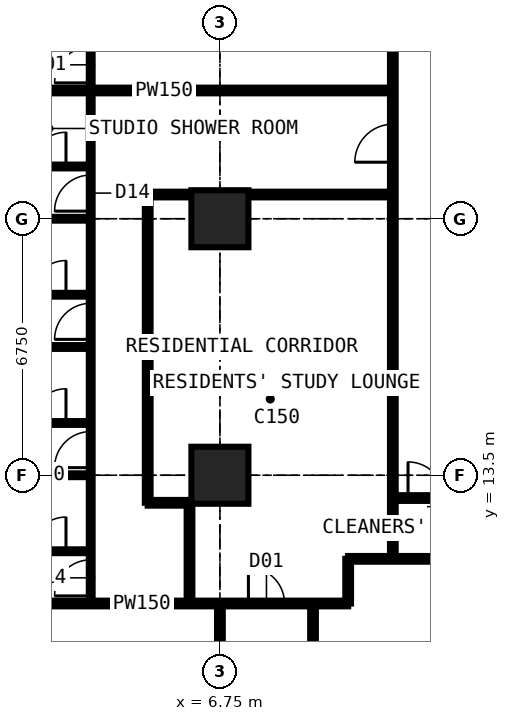
"""IFC4 building model, lengths in metres.
Left out: names, types, materials, properties, quantities, classifications, styles, units other than length and angle.
Written with IfcOpenShell. Run it as: python <this file> out.ifc"""

import sys

from ifc_helpers import new_model, si_unit, direction, frame, frame_2d, origin, origin_2d, place, context, subcontext, project, spatial, rectangle, extrude, element, fill, save


model = new_model("IFC4")
c1 = context("Model", 3, precision=1e-05, world=origin(), true_north=direction((0.0, 1.0)))
c2 = subcontext(c1, "Body", "Model", "MODEL_VIEW")
j1 = project(units=[si_unit("LENGTHUNIT", "METRE"), si_unit("PLANEANGLEUNIT", "RADIAN")], contexts=[c1])
p1 = place(None, origin())
s1 = spatial("IfcSite", under=j1, at=p1, CompositionType="ELEMENT")
p2 = place(p1, origin())
s2 = spatial("IfcBuilding", under=s1, at=p2, CompositionType="ELEMENT")
p3 = place(p2, frame((0.0, 0.0, 156.6)))
s3 = spatial("IfcBuildingStorey", under=s2, at=p3, CompositionType="ELEMENT", Elevation=156.6)
for number, where, z_axis, x_axis in (
    (1, (6.75, 13.5, 0.0), (0.0, 0.0, 1.0), (1.0, 0.0, 0.0)),
    (2, (6.75, 20.25, 0.0), (0.0, 0.0, 1.0), (1.0, 0.0, 0.0)),
):
    element("IfcColumn", number, at=place(p3, frame(where, z_axis=z_axis, x_axis=x_axis)), inside=s3, PredefinedType="COLUMN", context=c2, shape_type="SweptSolid", body=[
        extrude(rectangle(XDim=1.5, YDim=1.5, at=origin_2d()), origin(), (0.0, 0.0, 1.0), 3.6),
    ])
p4 = place(p3, frame((-0.734, 10.125, 0.0), z_axis=(0.0, 0.0, 1.0), x_axis=(1.0, 0.0, 0.0)))
e3 = element("IfcWall", 3, at=p4, inside=s3, PredefinedType="PARTITIONING", context=c2, shape_type="SweptSolid", body=[
    extrude(rectangle(XDim=10.859, YDim=0.15, at=frame_2d((5.429, 0.0))), origin(), (0.0, 0.0, 1.0), 3.375),
])
p5 = place(p4, frame((8.234, 0.0, 0.0)))
e4 = element("IfcOpeningElement", 4, at=p5, cuts=e3, PredefinedType="OPENING", context=c2, shape_type="SweptSolid", body=[
    extrude(rectangle(XDim=0.95, YDim=2.2, at=frame_2d((0.475, 1.1))), frame((0.0, 0.085, 0.0), z_axis=(0.0, -1.0, 0.0), x_axis=(1.0, 0.0, 0.0)), (0.0, 0.0, 1.0), 0.17),
])
p6 = place(p3, frame((-0.734, 13.5, 0.0), z_axis=(0.0, 0.0, 1.0), x_axis=(1.0, 0.0, 0.0)))
e5 = element("IfcWall", 5, at=p6, inside=s3, PredefinedType="PARTITIONING", context=c2, shape_type="SweptSolid", body=[
    extrude(rectangle(XDim=4.084, YDim=0.1, at=frame_2d((2.042, 0.0))), origin(), (0.0, 0.0, 1.0), 2.877),
])
p7 = place(p3, frame((-0.734, 16.875, 0.0), z_axis=(0.0, 0.0, 1.0), x_axis=(1.0, 0.0, 0.0)))
e6 = element("IfcWall", 6, at=p7, inside=s3, PredefinedType="PARTITIONING", context=c2, shape_type="SweptSolid", body=[
    extrude(rectangle(XDim=4.084, YDim=0.1, at=frame_2d((2.042, 0.0))), origin(), (0.0, 0.0, 1.0), 3.375),
])
p8 = place(p3, frame((-0.734, 20.25, 0.0), z_axis=(0.0, 0.0, 1.0), x_axis=(1.0, 0.0, 0.0)))
e7 = element("IfcWall", 7, at=p8, inside=s3, PredefinedType="PARTITIONING", context=c2, shape_type="SweptSolid", body=[
    extrude(rectangle(XDim=4.084, YDim=0.1, at=frame_2d((2.042, 0.0))), origin(), (0.0, 0.0, 1.0), 2.877),
])
p9 = place(p3, frame((-0.734, 23.625, 0.0), z_axis=(0.0, 0.0, 1.0), x_axis=(1.0, 0.0, 0.0)))
e8 = element("IfcWall", 8, at=p9, inside=s3, PredefinedType="PARTITIONING", context=c2, shape_type="SweptSolid", body=[
    extrude(rectangle(XDim=12.034, YDim=0.15, at=frame_2d((6.017, 0.0))), origin(), (0.0, 0.0, 1.0), 3.375),
])
p10 = place(p3, frame((1.15, 11.5, 0.0), z_axis=(0.0, 0.0, 1.0), x_axis=(1.0, 0.0, 0.0)))
e9 = element("IfcWall", 9, at=p10, inside=s3, PredefinedType="PARTITIONING", context=c2, shape_type="SweptSolid", body=[
    extrude(rectangle(XDim=2.2, YDim=0.1, at=frame_2d((1.1, 0.0))), origin(), (0.0, 0.0, 1.0), 3.375),
])
p11 = place(p10, frame((0.65, 0.0, 0.0)))
e10 = element("IfcOpeningElement", 10, at=p11, cuts=e9, PredefinedType="OPENING", context=c2, shape_type="SweptSolid", body=[
    extrude(rectangle(XDim=0.9, YDim=2.2, at=frame_2d((0.45, 1.1))), frame((0.0, 0.06, 0.0), z_axis=(0.0, -1.0, 0.0), x_axis=(1.0, 0.0, 0.0)), (0.0, 0.0, 1.0), 0.12),
])
p12 = place(p3, frame((1.15, 14.875, 0.0), z_axis=(0.0, 0.0, 1.0), x_axis=(1.0, 0.0, 0.0)))
e11 = element("IfcWall", 11, at=p12, inside=s3, PredefinedType="PARTITIONING", context=c2, shape_type="SweptSolid", body=[
    extrude(rectangle(XDim=2.2, YDim=0.1, at=frame_2d((1.1, 0.0))), origin(), (0.0, 0.0, 1.0), 3.375),
])
p13 = place(p12, frame((0.65, 0.0, 0.0)))
e12 = element("IfcOpeningElement", 12, at=p13, cuts=e11, PredefinedType="OPENING", context=c2, shape_type="SweptSolid", body=[
    extrude(rectangle(XDim=0.9, YDim=2.2, at=frame_2d((0.45, 1.1))), frame((0.0, 0.06, 0.0), z_axis=(0.0, -1.0, 0.0), x_axis=(1.0, 0.0, 0.0)), (0.0, 0.0, 1.0), 0.12),
])
p14 = place(p3, frame((1.15, 18.25, 0.0), z_axis=(0.0, 0.0, 1.0), x_axis=(1.0, 0.0, 0.0)))
e13 = element("IfcWall", 13, at=p14, inside=s3, PredefinedType="PARTITIONING", context=c2, shape_type="SweptSolid", body=[
    extrude(rectangle(XDim=2.2, YDim=0.1, at=frame_2d((1.1, 0.0))), origin(), (0.0, 0.0, 1.0), 3.375),
])
p15 = place(p14, frame((0.65, 0.0, 0.0)))
e14 = element("IfcOpeningElement", 14, at=p15, cuts=e13, PredefinedType="OPENING", context=c2, shape_type="SweptSolid", body=[
    extrude(rectangle(XDim=0.9, YDim=2.2, at=frame_2d((0.45, 1.1))), frame((0.0, 0.06, 0.0), z_axis=(0.0, -1.0, 0.0), x_axis=(1.0, 0.0, 0.0)), (0.0, 0.0, 1.0), 0.12),
])
p16 = place(p3, frame((1.15, 21.625, 0.0), z_axis=(0.0, 0.0, 1.0), x_axis=(1.0, 0.0, 0.0)))
e15 = element("IfcWall", 15, at=p16, inside=s3, PredefinedType="PARTITIONING", context=c2, shape_type="SweptSolid", body=[
    extrude(rectangle(XDim=2.2, YDim=0.1, at=frame_2d((1.1, 0.0))), origin(), (0.0, 0.0, 1.0), 3.375),
])
p17 = place(p16, frame((0.65, 0.0, 0.0)))
e16 = element("IfcOpeningElement", 16, at=p17, cuts=e15, PredefinedType="OPENING", context=c2, shape_type="SweptSolid", body=[
    extrude(rectangle(XDim=0.9, YDim=2.2, at=frame_2d((0.45, 1.1))), frame((0.0, 0.06, 0.0), z_axis=(0.0, -1.0, 0.0), x_axis=(1.0, 0.0, 0.0)), (0.0, 0.0, 1.0), 0.12),
])
p18 = place(p3, frame((3.35, 10.125, 0.0), z_axis=(0.0, 0.0, 1.0), x_axis=(0.0, 1.0, 0.0)))
e17 = element("IfcWall", 17, at=p18, inside=s3, PredefinedType="PARTITIONING", context=c2, shape_type="SweptSolid", body=[
    extrude(rectangle(XDim=16.875, YDim=0.1, at=frame_2d((8.438, 0.0))), origin(), (0.0, 0.0, 1.0), 3.375),
])
p19 = place(p18, frame((13.7, 0.0, 0.0)))
e18 = element("IfcOpeningElement", 18, at=p19, cuts=e17, PredefinedType="OPENING", context=c2, shape_type="SweptSolid", body=[
    extrude(rectangle(XDim=0.95, YDim=2.2, at=frame_2d((0.475, 1.1))), frame((0.0, 0.06, 0.0), z_axis=(0.0, -1.0, 0.0), x_axis=(1.0, 0.0, 0.0)), (0.0, 0.0, 1.0), 0.12),
])
p20 = place(p18, frame((0.2, 0.0, 0.0)))
e19 = element("IfcOpeningElement", 19, at=p20, cuts=e17, PredefinedType="OPENING", context=c2, shape_type="SweptSolid", body=[
    extrude(rectangle(XDim=0.95, YDim=2.2, at=frame_2d((0.475, 1.1))), frame((0.0, 0.06, 0.0), z_axis=(0.0, -1.0, 0.0), x_axis=(1.0, 0.0, 0.0)), (0.0, 0.0, 1.0), 0.12),
])
p21 = place(p18, frame((3.575, 0.0, 0.0)))
e20 = element("IfcOpeningElement", 20, at=p21, cuts=e17, PredefinedType="OPENING", context=c2, shape_type="SweptSolid", body=[
    extrude(rectangle(XDim=0.95, YDim=2.2, at=frame_2d((0.475, 1.1))), frame((0.0, 0.06, 0.0), z_axis=(0.0, -1.0, 0.0), x_axis=(1.0, 0.0, 0.0)), (0.0, 0.0, 1.0), 0.12),
])
p22 = place(p18, frame((6.95, 0.0, 0.0)))
e21 = element("IfcOpeningElement", 21, at=p22, cuts=e17, PredefinedType="OPENING", context=c2, shape_type="SweptSolid", body=[
    extrude(rectangle(XDim=0.95, YDim=2.2, at=frame_2d((0.475, 1.1))), frame((0.0, 0.06, 0.0), z_axis=(0.0, -1.0, 0.0), x_axis=(1.0, 0.0, 0.0)), (0.0, 0.0, 1.0), 0.12),
])
p23 = place(p18, frame((10.325, 0.0, 0.0)))
e22 = element("IfcOpeningElement", 22, at=p23, cuts=e17, PredefinedType="OPENING", context=c2, shape_type="SweptSolid", body=[
    extrude(rectangle(XDim=0.95, YDim=2.2, at=frame_2d((0.475, 1.1))), frame((0.0, 0.06, 0.0), z_axis=(0.0, -1.0, 0.0), x_axis=(1.0, 0.0, 0.0)), (0.0, 0.0, 1.0), 0.12),
])
p24 = place(p3, frame((4.85, 12.775, 0.0), z_axis=(0.0, 0.0, 1.0), x_axis=(0.0, 1.0, 0.0)))
e23 = element("IfcWall", 23, at=p24, inside=s3, PredefinedType="PARTITIONING", context=c2, shape_type="SweptSolid", body=[
    extrude(rectangle(XDim=8.113, YDim=0.15, at=frame_2d((4.056, 0.0))), origin(), (0.0, 0.0, 1.0), 3.375),
])
p25 = place(p3, frame((4.85, 12.775, 0.0), z_axis=(0.0, 0.0, 1.0), x_axis=(1.0, 0.0, 0.0)))
e24 = element("IfcWall", 24, at=p25, inside=s3, PredefinedType="PARTITIONING", context=c2, shape_type="SweptSolid", body=[
    extrude(rectangle(XDim=1.1, YDim=0.15, at=frame_2d((0.55, 0.0))), origin(), (0.0, 0.0, 1.0), 3.375),
])
p26 = place(p3, frame((4.85, 20.887, 0.0), z_axis=(0.0, 0.0, 1.0), x_axis=(1.0, 0.0, 0.0)))
e25 = element("IfcWall", 25, at=p26, inside=s3, PredefinedType="PARTITIONING", context=c2, shape_type="SweptSolid", body=[
    extrude(rectangle(XDim=6.45, YDim=0.15, at=frame_2d((3.225, 0.0))), origin(), (0.0, 0.0, 1.0), 3.375),
])
p27 = place(p3, frame((5.95, 10.125, 0.0), z_axis=(0.0, 0.0, 1.0), x_axis=(0.0, 1.0, 0.0)))
e26 = element("IfcWall", 26, at=p27, inside=s3, PredefinedType="PARTITIONING", context=c2, shape_type="SweptSolid", body=[
    extrude(rectangle(XDim=2.65, YDim=0.15, at=frame_2d((1.325, 0.0))), origin(), (0.0, 0.0, 1.0), 3.375),
])
p28 = place(p3, frame((6.75, -0.734, 0.0), z_axis=(0.0, 0.0, 1.0), x_axis=(0.0, 1.0, 0.0)))
e27 = element("IfcWall", 27, at=p28, inside=s3, PredefinedType="PARTITIONING", context=c2, shape_type="SweptSolid", body=[
    extrude(rectangle(XDim=10.859, YDim=0.15, at=frame_2d((5.429, 0.0))), origin(), (0.0, 0.0, 1.0), 2.877),
])
p29 = place(p28, frame((5.684, 0.0, 0.0)))
e28 = element("IfcOpeningElement", 28, at=p29, cuts=e27, PredefinedType="OPENING", context=c2, shape_type="SweptSolid", body=[
    extrude(rectangle(XDim=1.0, YDim=2.2, at=frame_2d((0.5, 1.1))), frame((0.0, 0.085, 0.0), z_axis=(0.0, -1.0, 0.0), x_axis=(1.0, 0.0, 0.0)), (0.0, 0.0, 1.0), 0.17),
])
p30 = place(p3, frame((9.2, 4.85, 0.0), z_axis=(0.0, 0.0, 1.0), x_axis=(0.0, 1.0, 0.0)))
e29 = element("IfcWall", 29, at=p30, inside=s3, PredefinedType="PARTITIONING", context=c2, shape_type="SweptSolid", body=[
    extrude(rectangle(XDim=5.275, YDim=0.15, at=frame_2d((2.637, 0.0))), origin(), (0.0, 0.0, 1.0), 3.375),
])
p31 = place(p3, frame((10.125, 10.125, 0.0), z_axis=(0.0, 0.0, 1.0), x_axis=(0.0, 1.0, 0.0)))
e30 = element("IfcWall", 30, at=p31, inside=s3, PredefinedType="PARTITIONING", context=c2, shape_type="SweptSolid", body=[
    extrude(rectangle(XDim=1.175, YDim=0.15, at=frame_2d((0.587, 0.0))), origin(), (0.0, 0.0, 1.0), 3.375),
])
p32 = place(p3, frame((10.125, 11.3, 0.0), z_axis=(0.0, 0.0, 1.0), x_axis=(1.0, 0.0, 0.0)))
e31 = element("IfcWall", 31, at=p32, inside=s3, PredefinedType="PARTITIONING", context=c2, shape_type="SweptSolid", body=[
    extrude(rectangle(XDim=20.475, YDim=0.15, at=frame_2d((10.238, 0.0))), origin(), (0.0, 0.0, 1.0), 3.375),
])
p33 = place(p32, frame((11.312, 0.0, 0.0)))
e32 = element("IfcOpeningElement", 32, at=p33, cuts=e31, PredefinedType="OPENING", context=c2, shape_type="SweptSolid", body=[
    extrude(rectangle(XDim=1.0, YDim=2.2, at=frame_2d((0.5, 1.1))), frame((0.0, 0.085, 0.0), z_axis=(0.0, -1.0, 0.0), x_axis=(1.0, 0.0, 0.0)), (0.0, 0.0, 1.0), 0.17),
])
p34 = place(p3, frame((11.3, 11.3, 0.0), z_axis=(0.0, 0.0, 1.0), x_axis=(0.0, 1.0, 0.0)))
e33 = element("IfcWall", 33, at=p34, inside=s3, PredefinedType="PARTITIONING", context=c2, shape_type="SweptSolid", body=[
    extrude(rectangle(XDim=19.3, YDim=0.15, at=frame_2d((9.65, 0.0))), origin(), (0.0, 0.0, 1.0), 3.375),
])
p35 = place(p34, frame((13.525, 0.0, 0.0)))
e34 = element("IfcOpeningElement", 34, at=p35, cuts=e33, PredefinedType="OPENING", context=c2, shape_type="SweptSolid", body=[
    extrude(rectangle(XDim=1.0, YDim=2.2, at=frame_2d((0.5, 1.1))), frame((0.0, 0.085, 0.0), z_axis=(0.0, -1.0, 0.0), x_axis=(1.0, 0.0, 0.0)), (0.0, 0.0, 1.0), 0.17),
])
p36 = place(p34, frame((10.438, 0.0, 0.0)))
e35 = element("IfcOpeningElement", 35, at=p36, cuts=e33, PredefinedType="OPENING", context=c2, shape_type="SweptSolid", body=[
    extrude(rectangle(XDim=1.0, YDim=2.2, at=frame_2d((0.5, 1.1))), frame((0.0, 0.085, 0.0), z_axis=(0.0, -1.0, 0.0), x_axis=(1.0, 0.0, 0.0)), (0.0, 0.0, 1.0), 0.17),
])
p37 = place(p3, frame((11.3, 12.9, 0.0), z_axis=(0.0, 0.0, 1.0), x_axis=(1.0, 0.0, 0.0)))
e36 = element("IfcWall", 36, at=p37, inside=s3, PredefinedType="PARTITIONING", context=c2, shape_type="SweptSolid", body=[
    extrude(rectangle(XDim=1.8, YDim=0.15, at=frame_2d((0.9, 0.0))), origin(), (0.0, 0.0, 1.0), 2.806),
])
p38 = place(p37, frame((0.4, 0.0, 0.0)))
e37 = element("IfcOpeningElement", 37, at=p38, cuts=e36, PredefinedType="OPENING", context=c2, shape_type="SweptSolid", body=[
    extrude(rectangle(XDim=0.95, YDim=2.2, at=frame_2d((0.475, 1.1))), frame((0.0, 0.085, 0.0), z_axis=(0.0, -1.0, 0.0), x_axis=(1.0, 0.0, 0.0)), (0.0, 0.0, 1.0), 0.17),
])
p39 = place(p38, origin())
e38 = element("IfcDoor", 38, at=p39, inside=s3, OperationType="SINGLE_SWING_LEFT", PredefinedType="DOOR", context=c2, shape_type="SweptSolid", body=[
    extrude(rectangle(XDim=0.95, YDim=2.2, at=frame_2d((0.475, 1.1))), frame((0.0, 0.025, 0.0), z_axis=(0.0, -1.0, 0.0), x_axis=(1.0, 0.0, 0.0)), (0.0, 0.0, 1.0), 0.05),
])
fill(e37, e38)
p40 = place(p19, origin())
e39 = element("IfcDoor", 39, at=p40, inside=s3, OperationType="SINGLE_SWING_LEFT", PredefinedType="DOOR", context=c2, shape_type="SweptSolid", body=[
    extrude(rectangle(XDim=0.95, YDim=2.2, at=frame_2d((0.475, 1.1))), frame((0.0, 0.025, 0.0), z_axis=(0.0, -1.0, 0.0), x_axis=(1.0, 0.0, 0.0)), (0.0, 0.0, 1.0), 0.05),
])
fill(e18, e39)
p41 = place(p20, origin())
e40 = element("IfcDoor", 40, at=p41, inside=s3, OperationType="SINGLE_SWING_LEFT", PredefinedType="DOOR", context=c2, shape_type="SweptSolid", body=[
    extrude(rectangle(XDim=0.95, YDim=2.2, at=frame_2d((0.475, 1.1))), frame((0.0, 0.025, 0.0), z_axis=(0.0, -1.0, 0.0), x_axis=(1.0, 0.0, 0.0)), (0.0, 0.0, 1.0), 0.05),
])
fill(e19, e40)
p42 = place(p11, origin())
e41 = element("IfcDoor", 41, at=p42, inside=s3, OperationType="SINGLE_SWING_RIGHT", PredefinedType="DOOR", context=c2, shape_type="SweptSolid", body=[
    extrude(rectangle(XDim=0.9, YDim=2.2, at=frame_2d((0.45, 1.1))), frame((0.0, 0.025, 0.0), z_axis=(0.0, -1.0, 0.0), x_axis=(1.0, 0.0, 0.0)), (0.0, 0.0, 1.0), 0.05),
])
fill(e10, e41)
p43 = place(p21, origin())
e42 = element("IfcDoor", 42, at=p43, inside=s3, OperationType="SINGLE_SWING_LEFT", PredefinedType="DOOR", context=c2, shape_type="SweptSolid", body=[
    extrude(rectangle(XDim=0.95, YDim=2.2, at=frame_2d((0.475, 1.1))), frame((0.0, 0.025, 0.0), z_axis=(0.0, -1.0, 0.0), x_axis=(1.0, 0.0, 0.0)), (0.0, 0.0, 1.0), 0.05),
])
fill(e20, e42)
p44 = place(p13, origin())
e43 = element("IfcDoor", 43, at=p44, inside=s3, OperationType="SINGLE_SWING_RIGHT", PredefinedType="DOOR", context=c2, shape_type="SweptSolid", body=[
    extrude(rectangle(XDim=0.9, YDim=2.2, at=frame_2d((0.45, 1.1))), frame((0.0, 0.025, 0.0), z_axis=(0.0, -1.0, 0.0), x_axis=(1.0, 0.0, 0.0)), (0.0, 0.0, 1.0), 0.05),
])
fill(e12, e43)
p45 = place(p22, origin())
e44 = element("IfcDoor", 44, at=p45, inside=s3, OperationType="SINGLE_SWING_LEFT", PredefinedType="DOOR", context=c2, shape_type="SweptSolid", body=[
    extrude(rectangle(XDim=0.95, YDim=2.2, at=frame_2d((0.475, 1.1))), frame((0.0, 0.025, 0.0), z_axis=(0.0, -1.0, 0.0), x_axis=(1.0, 0.0, 0.0)), (0.0, 0.0, 1.0), 0.05),
])
fill(e21, e44)
p46 = place(p15, origin())
e45 = element("IfcDoor", 45, at=p46, inside=s3, OperationType="SINGLE_SWING_RIGHT", PredefinedType="DOOR", context=c2, shape_type="SweptSolid", body=[
    extrude(rectangle(XDim=0.9, YDim=2.2, at=frame_2d((0.45, 1.1))), frame((0.0, 0.025, 0.0), z_axis=(0.0, -1.0, 0.0), x_axis=(1.0, 0.0, 0.0)), (0.0, 0.0, 1.0), 0.05),
])
fill(e14, e45)
p47 = place(p23, origin())
e46 = element("IfcDoor", 46, at=p47, inside=s3, OperationType="SINGLE_SWING_LEFT", PredefinedType="DOOR", context=c2, shape_type="SweptSolid", body=[
    extrude(rectangle(XDim=0.95, YDim=2.2, at=frame_2d((0.475, 1.1))), frame((0.0, 0.025, 0.0), z_axis=(0.0, -1.0, 0.0), x_axis=(1.0, 0.0, 0.0)), (0.0, 0.0, 1.0), 0.05),
])
fill(e22, e46)
p48 = place(p17, origin())
e47 = element("IfcDoor", 47, at=p48, inside=s3, OperationType="SINGLE_SWING_RIGHT", PredefinedType="DOOR", context=c2, shape_type="SweptSolid", body=[
    extrude(rectangle(XDim=0.9, YDim=2.2, at=frame_2d((0.45, 1.1))), frame((0.0, 0.025, 0.0), z_axis=(0.0, -1.0, 0.0), x_axis=(1.0, 0.0, 0.0)), (0.0, 0.0, 1.0), 0.05),
])
fill(e16, e47)
p49 = place(p36, origin())
e48 = element("IfcDoor", 48, at=p49, inside=s3, OperationType="SINGLE_SWING_LEFT", PredefinedType="DOOR", context=c2, shape_type="SweptSolid", body=[
    extrude(rectangle(XDim=1.0, YDim=2.2, at=frame_2d((0.5, 1.1))), frame((0.0, 0.025, 0.0), z_axis=(0.0, -1.0, 0.0), x_axis=(1.0, 0.0, 0.0)), (0.0, 0.0, 1.0), 0.05),
])
fill(e35, e48)
p50 = place(p5, origin())
e49 = element("IfcDoor", 49, at=p50, inside=s3, OperationType="SINGLE_SWING_LEFT", PredefinedType="DOOR", context=c2, shape_type="SweptSolid", body=[
    extrude(rectangle(XDim=0.95, YDim=2.2, at=frame_2d((0.475, 1.1))), frame((0.0, 0.025, 0.0), z_axis=(0.0, -1.0, 0.0), x_axis=(1.0, 0.0, 0.0)), (0.0, 0.0, 1.0), 0.05),
])
fill(e4, e49)
save(model, sys.argv[1])
